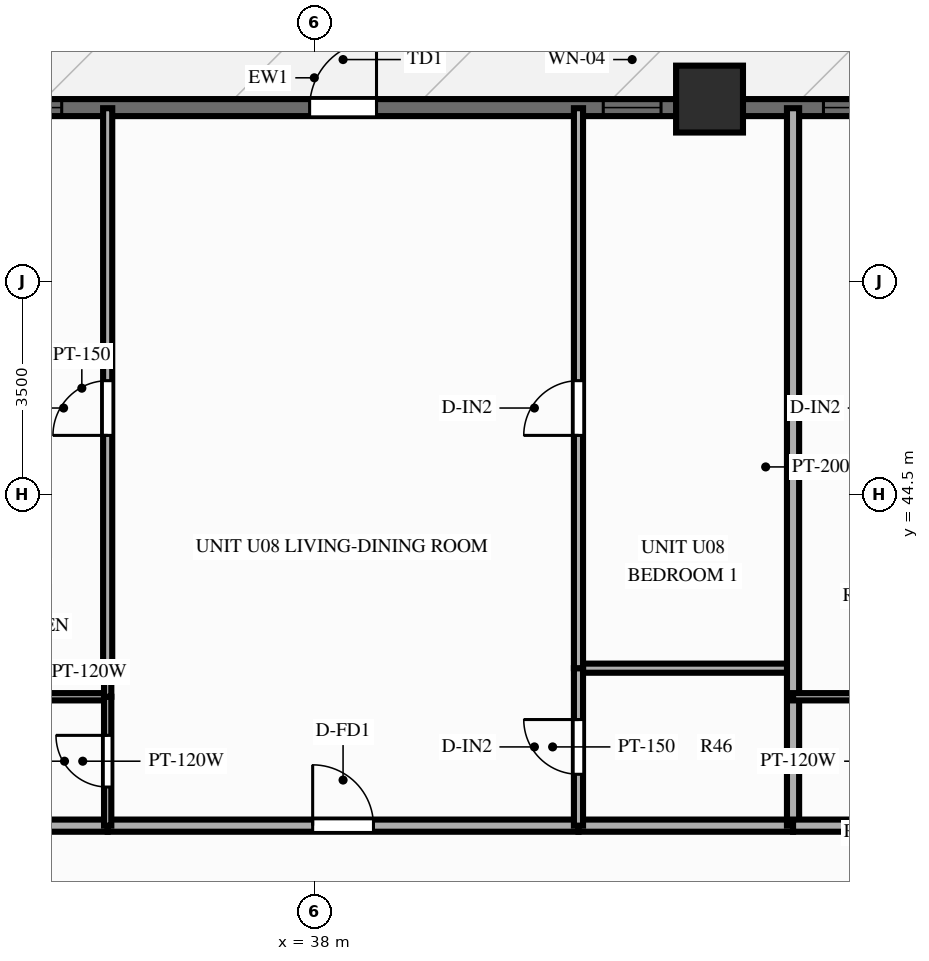
"""IFC4 building model, lengths in metres.
Left out: names, types, materials, properties, quantities, classifications, styles, units other than length and angle.
Written with IfcOpenShell. Run it as: python <this file> out.ifc"""

import sys

from ifc_helpers import new_model, si_unit, direction, frame, frame_2d, origin, origin_2d, place, context, subcontext, project, spatial, rectangle, extrude, source, transform, mapped, element, fill, save


model = new_model("IFC4")
c1 = context("Model", 3, precision=1e-05, world=origin(), true_north=direction((0.0, 1.0)))
c2 = subcontext(c1, "Body", "Model", "MODEL_VIEW")
j1 = project(units=[si_unit("LENGTHUNIT", "METRE"), si_unit("PLANEANGLEUNIT", "RADIAN")], contexts=[c1])
p1 = place(None, origin())
s1 = spatial("IfcSite", under=j1, at=p1, CompositionType="ELEMENT")
p2 = place(p1, origin())
s2 = spatial("IfcBuilding", under=s1, at=p2, CompositionType="ELEMENT")
p3 = place(p2, frame((0.0, 0.0, 25.4)))
s3 = spatial("IfcBuildingStorey", under=s2, at=p3, CompositionType="ELEMENT", Elevation=25.4)
m1 = source(origin(), c2, "Body", "SweptSolid", [
    extrude(rectangle(XDim=1.1, YDim=1.1, at=origin_2d()), origin(), (0.0, 0.0, 1.0), 3.0),
])
p4 = place(p3, frame((44.5, 51.0, 0.0), z_axis=(0.0, 0.0, 1.0), x_axis=(1.0, 0.0, 0.0)))
e1 = element("IfcColumn", 1, at=p4, inside=s3, PredefinedType="COLUMN", context=c2, shape_type="MappedRepresentation", body=[
    mapped(m1, transform((0.0, 0.0, 0.0), scale=1.0)),
])
p5 = place(p3, frame((15.5, 50.86, 0.0), z_axis=(0.0, 0.0, 1.0), x_axis=(1.0, 0.0, 0.0)))
e2 = element("IfcWall", 2, at=p5, inside=s3, PredefinedType="SOLIDWALL", context=c2, shape_type="SweptSolid", body=[
    extrude(rectangle(XDim=45.0, YDim=0.28, at=frame_2d((22.5, 0.0))), origin(), (0.0, 0.0, 1.0), 2.28),
])
p6 = place(p5, frame((0.76, 0.0, 0.25)))
e3 = element("IfcOpeningElement", 3, at=p6, cuts=e2, PredefinedType="OPENING", context=c2, shape_type="SweptSolid", body=[
    extrude(rectangle(XDim=1.2, YDim=1.5, at=frame_2d((0.6, 0.75))), frame((0.0, 0.152, 0.0), z_axis=(0.0, -1.0, 0.0), x_axis=(1.0, 0.0, 0.0)), (0.0, 0.0, 1.0), 0.304),
])
p7 = place(p5, frame((3.494, 0.0, 0.25)))
e4 = element("IfcOpeningElement", 4, at=p7, cuts=e2, PredefinedType="OPENING", context=c2, shape_type="SweptSolid", body=[
    extrude(rectangle(XDim=1.2, YDim=1.5, at=frame_2d((0.6, 0.75))), frame((0.0, 0.152, 0.0), z_axis=(0.0, -1.0, 0.0), x_axis=(1.0, 0.0, 0.0)), (0.0, 0.0, 1.0), 0.304),
])
p8 = place(p5, frame((8.741, 0.0, 0.25)))
e5 = element("IfcOpeningElement", 5, at=p8, cuts=e2, PredefinedType="OPENING", context=c2, shape_type="SweptSolid", body=[
    extrude(rectangle(XDim=1.2, YDim=1.5, at=frame_2d((0.6, 0.75))), frame((0.0, 0.152, 0.0), z_axis=(0.0, -1.0, 0.0), x_axis=(1.0, 0.0, 0.0)), (0.0, 0.0, 1.0), 0.304),
])
p9 = place(p5, frame((13.616, 0.0, 0.25)))
e6 = element("IfcOpeningElement", 6, at=p9, cuts=e2, PredefinedType="OPENING", context=c2, shape_type="SweptSolid", body=[
    extrude(rectangle(XDim=1.2, YDim=1.5, at=frame_2d((0.6, 0.75))), frame((0.0, 0.152, 0.0), z_axis=(0.0, -1.0, 0.0), x_axis=(1.0, 0.0, 0.0)), (0.0, 0.0, 1.0), 0.304),
])
p10 = place(p5, frame((17.146, 0.0, 0.25)))
e7 = element("IfcOpeningElement", 7, at=p10, cuts=e2, PredefinedType="OPENING", context=c2, shape_type="SweptSolid", body=[
    extrude(rectangle(XDim=1.2, YDim=1.5, at=frame_2d((0.6, 0.75))), frame((0.0, 0.152, 0.0), z_axis=(0.0, -1.0, 0.0), x_axis=(1.0, 0.0, 0.0)), (0.0, 0.0, 1.0), 0.304),
])
p11 = place(p5, frame((22.423, 0.0, 0.0)))
e8 = element("IfcOpeningElement", 8, at=p11, cuts=e2, PredefinedType="OPENING", context=c2, shape_type="SweptSolid", body=[
    extrude(rectangle(XDim=1.1, YDim=2.15, at=frame_2d((0.55, 1.075))), frame((0.0, 0.152, 0.0), z_axis=(0.0, -1.0, 0.0), x_axis=(1.0, 0.0, 0.0)), (0.0, 0.0, 1.0), 0.304),
])
p12 = place(p5, frame((27.252, 0.0, 0.25)))
e9 = element("IfcOpeningElement", 9, at=p12, cuts=e2, PredefinedType="OPENING", context=c2, shape_type="SweptSolid", body=[
    extrude(rectangle(XDim=0.95, YDim=1.5, at=frame_2d((0.475, 0.75))), frame((0.0, 0.152, 0.0), z_axis=(0.0, -1.0, 0.0), x_axis=(1.0, 0.0, 0.0)), (0.0, 0.0, 1.0), 0.304),
])
p13 = place(p5, frame((30.873, 0.0, 0.25)))
e10 = element("IfcOpeningElement", 10, at=p13, cuts=e2, PredefinedType="OPENING", context=c2, shape_type="SweptSolid", body=[
    extrude(rectangle(XDim=1.2, YDim=1.5, at=frame_2d((0.6, 0.75))), frame((0.0, 0.152, 0.0), z_axis=(0.0, -1.0, 0.0), x_axis=(1.0, 0.0, 0.0)), (0.0, 0.0, 1.0), 0.304),
])
p14 = place(p5, frame((33.113, 0.0, 0.25)))
e11 = element("IfcOpeningElement", 11, at=p14, cuts=e2, PredefinedType="OPENING", context=c2, shape_type="SweptSolid", body=[
    extrude(rectangle(XDim=1.2, YDim=1.5, at=frame_2d((0.6, 0.75))), frame((0.0, 0.152, 0.0), z_axis=(0.0, -1.0, 0.0), x_axis=(1.0, 0.0, 0.0)), (0.0, 0.0, 1.0), 0.304),
])
p15 = place(p5, frame((35.624, 0.0, 0.25)))
e12 = element("IfcOpeningElement", 12, at=p15, cuts=e2, PredefinedType="OPENING", context=c2, shape_type="SweptSolid", body=[
    extrude(rectangle(XDim=1.2, YDim=1.5, at=frame_2d((0.6, 0.75))), frame((0.0, 0.152, 0.0), z_axis=(0.0, -1.0, 0.0), x_axis=(1.0, 0.0, 0.0)), (0.0, 0.0, 1.0), 0.304),
])
p16 = place(p5, frame((38.097, 0.0, 0.25)))
e13 = element("IfcOpeningElement", 13, at=p16, cuts=e2, PredefinedType="OPENING", context=c2, shape_type="SweptSolid", body=[
    extrude(rectangle(XDim=1.2, YDim=1.5, at=frame_2d((0.6, 0.75))), frame((0.0, 0.152, 0.0), z_axis=(0.0, -1.0, 0.0), x_axis=(1.0, 0.0, 0.0)), (0.0, 0.0, 1.0), 0.304),
])
p17 = place(p5, frame((40.336, 0.0, 0.25)))
e14 = element("IfcOpeningElement", 14, at=p17, cuts=e2, PredefinedType="OPENING", context=c2, shape_type="SweptSolid", body=[
    extrude(rectangle(XDim=1.2, YDim=1.5, at=frame_2d((0.6, 0.75))), frame((0.0, 0.152, 0.0), z_axis=(0.0, -1.0, 0.0), x_axis=(1.0, 0.0, 0.0)), (0.0, 0.0, 1.0), 0.304),
])
p18 = place(p5, frame((42.743, 0.0, 0.25)))
e15 = element("IfcOpeningElement", 15, at=p18, cuts=e2, PredefinedType="OPENING", context=c2, shape_type="SweptSolid", body=[
    extrude(rectangle(XDim=1.2, YDim=1.5, at=frame_2d((0.6, 0.75))), frame((0.0, 0.152, 0.0), z_axis=(0.0, -1.0, 0.0), x_axis=(1.0, 0.0, 0.0)), (0.0, 0.0, 1.0), 0.304),
])
p19 = place(p3, frame((31.852, 39.05, 0.0), z_axis=(0.0, 0.0, 1.0), x_axis=(1.0, 0.0, 0.0)))
e16 = element("IfcWall", 16, at=p19, inside=s3, PredefinedType="PARTITIONING", context=c2, shape_type="SweptSolid", body=[
    extrude(rectangle(XDim=2.75, YDim=0.2, at=frame_2d((1.375, 0.0))), origin(), (0.0, 0.0, 1.0), 2.79),
])
p20 = place(p3, frame((34.602, 39.05, 0.0), z_axis=(0.0, 0.0, 1.0), x_axis=(1.0, 0.0, 0.0)))
e17 = element("IfcWall", 17, at=p20, inside=s3, PredefinedType="PARTITIONING", context=c2, shape_type="SweptSolid", body=[
    extrude(rectangle(XDim=7.743, YDim=0.2, at=frame_2d((3.871, 0.0))), origin(), (0.0, 0.0, 1.0), 2.79),
])
p21 = place(p20, frame((3.371, 0.0, 0.0)))
e18 = element("IfcOpeningElement", 18, at=p21, cuts=e17, PredefinedType="OPENING", context=c2, shape_type="SweptSolid", body=[
    extrude(rectangle(XDim=1.0, YDim=2.15, at=frame_2d((0.5, 1.075))), frame((0.0, 0.112, 0.0), z_axis=(0.0, -1.0, 0.0), x_axis=(1.0, 0.0, 0.0)), (0.0, 0.0, 1.0), 0.224),
])
p22 = place(p3, frame((42.344, 39.05, 0.0), z_axis=(0.0, 0.0, 1.0), x_axis=(1.0, 0.0, 0.0)))
e19 = element("IfcWall", 19, at=p22, inside=s3, PredefinedType="PARTITIONING", context=c2, shape_type="SweptSolid", body=[
    extrude(rectangle(XDim=3.529, YDim=0.2, at=frame_2d((1.764, 0.0))), origin(), (0.0, 0.0, 1.0), 2.79),
])
p23 = place(p3, frame((31.852, 41.17, 0.0), z_axis=(0.0, 0.0, 1.0), x_axis=(1.0, 0.0, 0.0)))
e20 = element("IfcWall", 20, at=p23, inside=s3, PredefinedType="PARTITIONING", context=c2, shape_type="SweptSolid", body=[
    extrude(rectangle(XDim=2.75, YDim=0.12, at=frame_2d((1.375, 0.0))), origin(), (0.0, 0.0, 1.0), 2.79),
])
p24 = place(p3, frame((42.344, 41.64, 0.0), z_axis=(0.0, 0.0, 1.0), x_axis=(1.0, 0.0, 0.0)))
e21 = element("IfcWall", 21, at=p24, inside=s3, PredefinedType="PARTITIONING", context=c2, shape_type="SweptSolid", body=[
    extrude(rectangle(XDim=3.529, YDim=0.15, at=frame_2d((1.764, 0.0))), origin(), (0.0, 0.0, 1.0), 2.79),
])
p25 = place(p3, frame((34.602, 39.05, 0.0), z_axis=(0.0, 0.0, 1.0), x_axis=(0.0, 1.0, 0.0)))
e22 = element("IfcWall", 22, at=p25, inside=s3, PredefinedType="PARTITIONING", context=c2, shape_type="SweptSolid", body=[
    extrude(rectangle(XDim=2.12, YDim=0.12, at=frame_2d((1.06, 0.0))), origin(), (0.0, 0.0, 1.0), 2.79),
])
p26 = place(p25, frame((0.635, 0.0, 0.0)))
e23 = element("IfcOpeningElement", 23, at=p26, cuts=e22, PredefinedType="OPENING", context=c2, shape_type="SweptSolid", body=[
    extrude(rectangle(XDim=0.85, YDim=2.05, at=frame_2d((0.425, 1.025))), frame((0.0, 0.072, 0.0), z_axis=(0.0, -1.0, 0.0), x_axis=(1.0, 0.0, 0.0)), (0.0, 0.0, 1.0), 0.144),
])
p27 = place(p3, frame((34.602, 41.17, 0.0), z_axis=(0.0, 0.0, 1.0), x_axis=(0.0, 1.0, 0.0)))
e24 = element("IfcWall", 24, at=p27, inside=s3, PredefinedType="PARTITIONING", context=c2, shape_type="SweptSolid", body=[
    extrude(rectangle(XDim=0.47, YDim=0.12, at=frame_2d((0.235, 0.0))), origin(), (0.0, 0.0, 1.0), 2.79),
])
p28 = place(p3, frame((34.602, 41.64, 0.0), z_axis=(0.0, 0.0, 1.0), x_axis=(0.0, 1.0, 0.0)))
e25 = element("IfcWall", 25, at=p28, inside=s3, PredefinedType="PARTITIONING", context=c2, shape_type="SweptSolid", body=[
    extrude(rectangle(XDim=9.21, YDim=0.15, at=frame_2d((4.605, 0.0))), origin(), (0.0, 0.0, 1.0), 2.79),
])
p29 = place(p28, frame((3.829, 0.0, 0.0)))
e26 = element("IfcOpeningElement", 26, at=p29, cuts=e25, PredefinedType="OPENING", context=c2, shape_type="SweptSolid", body=[
    extrude(rectangle(XDim=0.9, YDim=2.1, at=frame_2d((0.45, 1.05))), frame((0.0, 0.087, 0.0), z_axis=(0.0, -1.0, 0.0), x_axis=(1.0, 0.0, 0.0)), (0.0, 0.0, 1.0), 0.174),
])
p30 = place(p3, frame((42.344, 39.05, 0.0), z_axis=(0.0, 0.0, 1.0), x_axis=(0.0, 1.0, 0.0)))
e27 = element("IfcWall", 27, at=p30, inside=s3, PredefinedType="PARTITIONING", context=c2, shape_type="SweptSolid", body=[
    extrude(rectangle(XDim=2.59, YDim=0.15, at=frame_2d((1.295, 0.0))), origin(), (0.0, 0.0, 1.0), 2.79),
])
p31 = place(p30, frame((0.845, 0.0, 0.0)))
e28 = element("IfcOpeningElement", 28, at=p31, cuts=e27, PredefinedType="OPENING", context=c2, shape_type="SweptSolid", body=[
    extrude(rectangle(XDim=0.9, YDim=2.1, at=frame_2d((0.45, 1.05))), frame((0.0, 0.087, 0.0), z_axis=(0.0, -1.0, 0.0), x_axis=(1.0, 0.0, 0.0)), (0.0, 0.0, 1.0), 0.174),
])
p32 = place(p3, frame((42.344, 41.64, 0.0), z_axis=(0.0, 0.0, 1.0), x_axis=(0.0, 1.0, 0.0)))
e29 = element("IfcWall", 29, at=p32, inside=s3, PredefinedType="PARTITIONING", context=c2, shape_type="SweptSolid", body=[
    extrude(rectangle(XDim=9.21, YDim=0.15, at=frame_2d((4.605, 0.0))), origin(), (0.0, 0.0, 1.0), 2.79),
])
p33 = place(p32, frame((3.829, 0.0, 0.0)))
e30 = element("IfcOpeningElement", 30, at=p33, cuts=e29, PredefinedType="OPENING", context=c2, shape_type="SweptSolid", body=[
    extrude(rectangle(XDim=0.9, YDim=2.1, at=frame_2d((0.45, 1.05))), frame((0.0, 0.087, 0.0), z_axis=(0.0, -1.0, 0.0), x_axis=(1.0, 0.0, 0.0)), (0.0, 0.0, 1.0), 0.174),
])
p34 = place(p3, frame((45.873, 39.05, 0.0), z_axis=(0.0, 0.0, 1.0), x_axis=(0.0, 1.0, 0.0)))
e31 = element("IfcWall", 31, at=p34, inside=s3, PredefinedType="PARTITIONING", context=c2, shape_type="SweptSolid", body=[
    extrude(rectangle(XDim=11.8, YDim=0.2, at=frame_2d((5.9, 0.0))), origin(), (0.0, 0.0, 1.0), 2.79),
])
p35 = place(p3, frame((45.873, 39.05, 0.0), z_axis=(0.0, 0.0, 1.0), x_axis=(1.0, 0.0, 0.0)))
e32 = element("IfcWall", 32, at=p35, inside=s3, PredefinedType="PARTITIONING", context=c2, shape_type="SweptSolid", body=[
    extrude(rectangle(XDim=2.2, YDim=0.2, at=frame_2d((1.1, 0.0))), origin(), (0.0, 0.0, 1.0), 2.79),
])
p36 = place(p3, frame((45.873, 41.17, 0.0), z_axis=(0.0, 0.0, 1.0), x_axis=(1.0, 0.0, 0.0)))
e33 = element("IfcWall", 33, at=p36, inside=s3, PredefinedType="PARTITIONING", context=c2, shape_type="SweptSolid", body=[
    extrude(rectangle(XDim=2.2, YDim=0.12, at=frame_2d((1.1, 0.0))), origin(), (0.0, 0.0, 1.0), 2.79),
])
m2 = source(origin(), c2, "Body", "SweptSolid", [
    extrude(rectangle(XDim=1.2, YDim=1.5, at=frame_2d((0.6, 0.75))), frame((0.0, 0.03, 0.0), z_axis=(0.0, -1.0, 0.0), x_axis=(1.0, 0.0, 0.0)), (0.0, 0.0, 1.0), 0.06),
])
p37 = place(p10, origin())
e34 = element("IfcWindow", 34, at=p37, inside=s3, PartitioningType="SINGLE_PANEL", PredefinedType="WINDOW", context=c2, shape_type="MappedRepresentation", body=[
    mapped(m2, transform((0.0, 0.0, 0.0), scale=1.0)),
])
fill(e7, e34)
m3 = source(origin(), c2, "Body", "SweptSolid", [
    extrude(rectangle(XDim=1.1, YDim=2.15, at=frame_2d((0.55, 1.075))), frame((0.0, 0.025, 0.0), z_axis=(0.0, -1.0, 0.0), x_axis=(1.0, 0.0, 0.0)), (0.0, 0.0, 1.0), 0.05),
])
p38 = place(p11, origin())
e35 = element("IfcDoor", 35, at=p38, inside=s3, OperationType="SINGLE_SWING_RIGHT", PredefinedType="DOOR", context=c2, shape_type="MappedRepresentation", body=[
    mapped(m3, transform((0.0, 0.0, 0.0), scale=1.0)),
])
fill(e8, e35)
m4 = source(origin(), c2, "Body", "SweptSolid", [
    extrude(rectangle(XDim=0.95, YDim=1.5, at=frame_2d((0.475, 0.75))), frame((0.0, 0.03, 0.0), z_axis=(0.0, -1.0, 0.0), x_axis=(1.0, 0.0, 0.0)), (0.0, 0.0, 1.0), 0.06),
])
p39 = place(p12, origin())
e36 = element("IfcWindow", 36, at=p39, inside=s3, PartitioningType="SINGLE_PANEL", PredefinedType="WINDOW", context=c2, shape_type="MappedRepresentation", body=[
    mapped(m4, transform((0.0, 0.0, 0.0), scale=1.0)),
])
fill(e9, e36)
p40 = place(p13, origin())
e37 = element("IfcWindow", 37, at=p40, inside=s3, PartitioningType="SINGLE_PANEL", PredefinedType="WINDOW", context=c2, shape_type="MappedRepresentation", body=[
    mapped(m2, transform((0.0, 0.0, 0.0), scale=1.0)),
])
fill(e10, e37)
m5 = source(origin(), c2, "Body", "SweptSolid", [
    extrude(rectangle(XDim=1.0, YDim=2.15, at=frame_2d((0.5, 1.075))), frame((0.0, 0.025, 0.0), z_axis=(0.0, -1.0, 0.0), x_axis=(1.0, 0.0, 0.0)), (0.0, 0.0, 1.0), 0.05),
])
p41 = place(p21, origin())
e38 = element("IfcDoor", 38, at=p41, inside=s3, OperationType="SINGLE_SWING_LEFT", PredefinedType="DOOR", context=c2, shape_type="MappedRepresentation", body=[
    mapped(m5, transform((0.0, 0.0, 0.0), scale=1.0)),
])
fill(e18, e38)
m6 = source(origin(), c2, "Body", "SweptSolid", [
    extrude(rectangle(XDim=0.85, YDim=2.05, at=frame_2d((0.425, 1.025))), frame((0.0, 0.025, 0.0), z_axis=(0.0, -1.0, 0.0), x_axis=(1.0, 0.0, 0.0)), (0.0, 0.0, 1.0), 0.05),
])
p42 = place(p26, origin())
e39 = element("IfcDoor", 39, at=p42, inside=s3, OperationType="SINGLE_SWING_RIGHT", PredefinedType="DOOR", context=c2, shape_type="MappedRepresentation", body=[
    mapped(m6, transform((0.0, 0.0, 0.0), scale=1.0)),
])
fill(e23, e39)
m7 = source(origin(), c2, "Body", "SweptSolid", [
    extrude(rectangle(XDim=0.9, YDim=2.1, at=frame_2d((0.45, 1.05))), frame((0.0, 0.025, 0.0), z_axis=(0.0, -1.0, 0.0), x_axis=(1.0, 0.0, 0.0)), (0.0, 0.0, 1.0), 0.05),
])
p43 = place(p29, origin())
e40 = element("IfcDoor", 40, at=p43, inside=s3, OperationType="SINGLE_SWING_LEFT", PredefinedType="DOOR", context=c2, shape_type="MappedRepresentation", body=[
    mapped(m7, transform((0.0, 0.0, 0.0), scale=1.0)),
])
fill(e26, e40)
p44 = place(p31, origin())
e41 = element("IfcDoor", 41, at=p44, inside=s3, OperationType="SINGLE_SWING_RIGHT", PredefinedType="DOOR", context=c2, shape_type="MappedRepresentation", body=[
    mapped(m7, transform((0.0, 0.0, 0.0), scale=1.0)),
])
fill(e28, e41)
p45 = place(p33, origin())
e42 = element("IfcDoor", 42, at=p45, inside=s3, OperationType="SINGLE_SWING_LEFT", PredefinedType="DOOR", context=c2, shape_type="MappedRepresentation", body=[
    mapped(m7, transform((0.0, 0.0, 0.0), scale=1.0)),
])
fill(e30, e42)
save(model, sys.argv[1])
